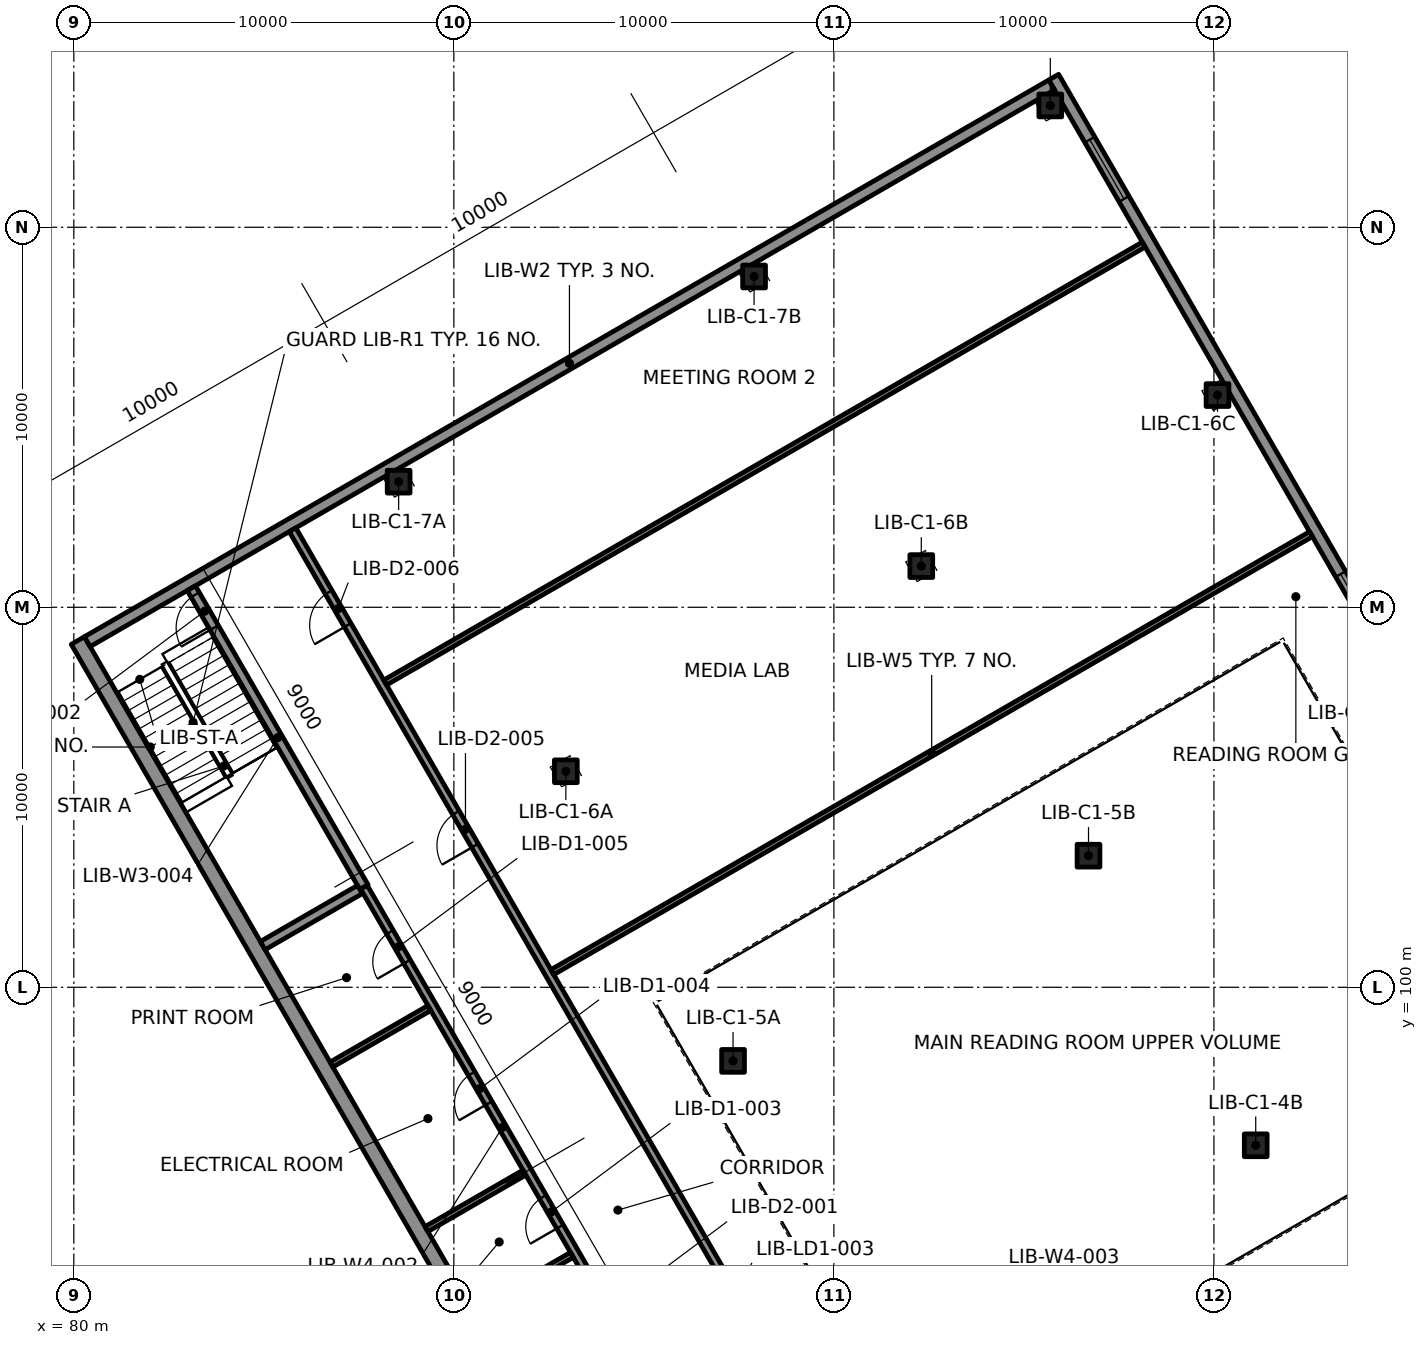
"""IFC4 building model, lengths in metres.
Left out: names, types, materials, properties, quantities, classifications, styles, units other than length and angle.
Written with IfcOpenShell. Run it as: python <this file> out.ifc"""

import sys

from ifc_helpers import new_model, si_unit, direction, frame, frame_2d, origin, origin_2d, place, context, subcontext, project, spatial, rectangle, extrude, element, fill, save


model = new_model("IFC4")
c1 = context("Model", 3, precision=1e-05, world=origin(), true_north=direction((0.0, 1.0)))
c2 = subcontext(c1, "Body", "Model", "MODEL_VIEW")
j1 = project(units=[si_unit("LENGTHUNIT", "METRE"), si_unit("PLANEANGLEUNIT", "RADIAN")], contexts=[c1])
p1 = place(None, origin())
s1 = spatial("IfcSite", under=j1, at=p1, CompositionType="ELEMENT")
p2 = place(p1, origin())
s2 = spatial("IfcBuilding", under=s1, at=p2, CompositionType="ELEMENT")
p3 = place(p2, frame((0.0, 0.0, 12.6)))
s3 = spatial("IfcBuildingStorey", under=s2, at=p3, CompositionType="ELEMENT", Elevation=12.6)
for number, where, z_axis, x_axis in (
    (1, (87.421, 93.256, -0.0), (0.0, 0.0, 1.0), (-0.5, 0.866, 0.0)),
    (2, (82.621, 101.57, -0.0), (0.0, 0.0, 1.0), (-0.5, 0.866, 0.0)),
):
    element("IfcColumn", number, at=place(p3, frame(where, z_axis=z_axis, x_axis=x_axis)), inside=s3, PredefinedType="COLUMN", context=c2, shape_type="SweptSolid", body=[
        extrude(rectangle(XDim=1.2, YDim=1.5, at=origin_2d()), origin(), (0.0, 0.0, 1.0), 4.6),
    ])
p4 = place(p3, frame((75.975, 98.1, 0.0), z_axis=(0.0, 0.0, 1.0), x_axis=(1.0, 0.0, 0.0)))
e3 = element("IfcWall", 3, at=p4, inside=s3, PredefinedType="PARTITIONING", context=c2, shape_type="SweptSolid", body=[
    extrude(rectangle(XDim=5.649, YDim=0.15, at=frame_2d((2.825, 0.0))), origin(), (0.0, 0.0, 1.0), 3.7),
])
p5 = place(p3, frame((81.7, 87.5, 0.0), z_axis=(0.0, 0.0, 1.0), x_axis=(0.0, 1.0, 0.0)))
e4 = element("IfcWall", 4, at=p5, inside=s3, PredefinedType="PARTITIONING", context=c2, shape_type="SweptSolid", body=[
    extrude(rectangle(XDim=10.599, YDim=0.15, at=frame_2d((5.3, 0.0))), origin(), (0.0, 0.0, 1.0), 3.7),
])
for number, where, z_axis, x_axis in (
    (5, (111.1, 95.842, -0.36), (0.0, 0.0, 1.0), (1.0, 0.0, 0.0)),
    (6, (97.347, 98.063, -0.36), (0.0, 0.0, 1.0), (1.0, 0.0, 0.0)),
    (7, (106.7, 103.463, -0.36), (0.0, 0.0, 1.0), (1.0, 0.0, 0.0)),
    (8, (92.947, 105.684, -0.36), (0.0, 0.0, 1.0), (1.0, 0.0, 0.0)),
    (9, (102.3, 111.084, -0.36), (0.0, 0.0, 1.0), (1.0, 0.0, 0.0)),
    (10, (110.094, 115.584, -0.36), (0.0, 0.0, 1.0), (1.0, 0.0, 0.0)),
    (11, (88.547, 113.305, -0.36), (0.0, 0.0, 1.0), (1.0, 0.0, 0.0)),
    (12, (97.9, 118.705, -0.36), (0.0, 0.0, 1.0), (1.0, 0.0, 0.0)),
    (13, (105.694, 123.205, -0.36), (0.0, 0.0, 1.0), (1.0, 0.0, 0.0)),
):
    element("IfcColumn", number, at=place(p3, frame(where, z_axis=z_axis, x_axis=x_axis)), inside=s3, PredefinedType="COLUMN", context=c2, shape_type="SweptSolid", body=[
        extrude(rectangle(XDim=0.6, YDim=0.6, at=origin_2d()), origin(), (0.0, 0.0, 1.0), 4.6),
    ])
p6 = place(p3, frame((107.106, 62.36, 0.0), z_axis=(0.0, 0.0, 1.0), x_axis=(-0.49999992739, 0.866025445706, 0.0)))
e14 = element("IfcWall", 14, at=p6, inside=s3, PredefinedType="SOLIDWALL", context=c2, shape_type="SweptSolid", body=[
    extrude(rectangle(XDim=54.0, YDim=0.4, at=frame_2d((27.0, 0.0))), origin(), (0.0, 0.0, 1.0), 4.24),
])
p7 = place(p3, frame((132.784, 77.185, 0.0), z_axis=(0.0, 0.0, 1.0), x_axis=(-0.49999992739, 0.866025445706, 0.0)))
e15 = element("IfcWall", 15, at=p7, inside=s3, PredefinedType="SOLIDWALL", context=c2, shape_type="SweptSolid", body=[
    extrude(rectangle(XDim=54.0, YDim=0.3, at=frame_2d((27.0, 0.0))), origin(), (0.0, 0.0, 1.0), 4.24),
])
p8 = place(p7, frame((1.9, 0.0, 0.9)))
e16 = element("IfcOpeningElement", 16, at=p8, cuts=e15, PredefinedType="OPENING", context=c2, shape_type="SweptSolid", body=[
    extrude(rectangle(XDim=1.8, YDim=2.4, at=frame_2d((0.9, 1.2))), frame((0.0, 0.16, 0.0), z_axis=(0.0, -1.0, 0.0), x_axis=(1.0, 0.0, 0.0)), (0.0, 0.0, 1.0), 0.32),
])
p9 = place(p7, frame((6.3, 0.0, 0.9)))
e17 = element("IfcOpeningElement", 17, at=p9, cuts=e15, PredefinedType="OPENING", context=c2, shape_type="SweptSolid", body=[
    extrude(rectangle(XDim=1.8, YDim=2.4, at=frame_2d((0.9, 1.2))), frame((0.0, 0.16, 0.0), z_axis=(0.0, -1.0, 0.0), x_axis=(1.0, 0.0, 0.0)), (0.0, 0.0, 1.0), 0.32),
])
p10 = place(p7, frame((10.7, 0.0, 0.9)))
e18 = element("IfcOpeningElement", 18, at=p10, cuts=e15, PredefinedType="OPENING", context=c2, shape_type="SweptSolid", body=[
    extrude(rectangle(XDim=1.8, YDim=2.4, at=frame_2d((0.9, 1.2))), frame((0.0, 0.16, 0.0), z_axis=(0.0, -1.0, 0.0), x_axis=(1.0, 0.0, 0.0)), (0.0, 0.0, 1.0), 0.32),
])
p11 = place(p7, frame((15.1, 0.0, 0.9)))
e19 = element("IfcOpeningElement", 19, at=p11, cuts=e15, PredefinedType="OPENING", context=c2, shape_type="SweptSolid", body=[
    extrude(rectangle(XDim=1.8, YDim=2.4, at=frame_2d((0.9, 1.2))), frame((0.0, 0.16, 0.0), z_axis=(0.0, -1.0, 0.0), x_axis=(1.0, 0.0, 0.0)), (0.0, 0.0, 1.0), 0.32),
])
p12 = place(p7, frame((19.5, 0.0, 0.9)))
e20 = element("IfcOpeningElement", 20, at=p12, cuts=e15, PredefinedType="OPENING", context=c2, shape_type="SweptSolid", body=[
    extrude(rectangle(XDim=1.8, YDim=2.4, at=frame_2d((0.9, 1.2))), frame((0.0, 0.16, 0.0), z_axis=(0.0, -1.0, 0.0), x_axis=(1.0, 0.0, 0.0)), (0.0, 0.0, 1.0), 0.32),
])
p13 = place(p7, frame((23.9, 0.0, 0.9)))
e21 = element("IfcOpeningElement", 21, at=p13, cuts=e15, PredefinedType="OPENING", context=c2, shape_type="SweptSolid", body=[
    extrude(rectangle(XDim=1.8, YDim=2.4, at=frame_2d((0.9, 1.2))), frame((0.0, 0.16, 0.0), z_axis=(0.0, -1.0, 0.0), x_axis=(1.0, 0.0, 0.0)), (0.0, 0.0, 1.0), 0.32),
])
p14 = place(p7, frame((28.3, 0.0, 0.9)))
e22 = element("IfcOpeningElement", 22, at=p14, cuts=e15, PredefinedType="OPENING", context=c2, shape_type="SweptSolid", body=[
    extrude(rectangle(XDim=1.8, YDim=2.4, at=frame_2d((0.9, 1.2))), frame((0.0, 0.16, 0.0), z_axis=(0.0, -1.0, 0.0), x_axis=(1.0, 0.0, 0.0)), (0.0, 0.0, 1.0), 0.32),
])
p15 = place(p7, frame((32.7, 0.0, 0.9)))
e23 = element("IfcOpeningElement", 23, at=p15, cuts=e15, PredefinedType="OPENING", context=c2, shape_type="SweptSolid", body=[
    extrude(rectangle(XDim=1.8, YDim=2.4, at=frame_2d((0.9, 1.2))), frame((0.0, 0.16, 0.0), z_axis=(0.0, -1.0, 0.0), x_axis=(1.0, 0.0, 0.0)), (0.0, 0.0, 1.0), 0.32),
])
p16 = place(p7, frame((37.1, 0.0, 0.9)))
e24 = element("IfcOpeningElement", 24, at=p16, cuts=e15, PredefinedType="OPENING", context=c2, shape_type="SweptSolid", body=[
    extrude(rectangle(XDim=1.8, YDim=2.4, at=frame_2d((0.9, 1.2))), frame((0.0, 0.16, 0.0), z_axis=(0.0, -1.0, 0.0), x_axis=(1.0, 0.0, 0.0)), (0.0, 0.0, 1.0), 0.32),
])
p17 = place(p7, frame((50.3, 0.0, 0.9)))
e25 = element("IfcOpeningElement", 25, at=p17, cuts=e15, PredefinedType="OPENING", context=c2, shape_type="SweptSolid", body=[
    extrude(rectangle(XDim=1.8, YDim=2.4, at=frame_2d((0.9, 1.2))), frame((0.0, 0.16, 0.0), z_axis=(0.0, -1.0, 0.0), x_axis=(1.0, 0.0, 0.0)), (0.0, 0.0, 1.0), 0.32),
])
p18 = place(p3, frame((80.354, 109.095, 0.0), z_axis=(0.0, 0.0, 1.0), x_axis=(0.866026568746, 0.499997982221, 0.0)))
e26 = element("IfcWall", 26, at=p18, inside=s3, PredefinedType="SOLIDWALL", context=c2, shape_type="SweptSolid", body=[
    extrude(rectangle(XDim=29.3, YDim=0.3, at=frame_2d((14.65, 0.0))), origin(), (0.0, 0.0, 1.0), 4.24),
])
p19 = place(p3, frame((87.635, 102.635, 0.0), z_axis=(0.0, 0.0, 1.0), x_axis=(-0.499994616197, 0.866028512102, 0.0)))
e27 = element("IfcWall", 27, at=p19, inside=s3, PredefinedType="SOLIDWALL", context=c2, shape_type="SweptSolid", body=[
    extrude(rectangle(XDim=9.085, YDim=0.25, at=frame_2d((4.542, 0.0))), origin(), (0.0, 0.0, 1.0), 4.24),
])
p20 = place(p19, frame((7.885, 0.0, 0.0)))
e28 = element("IfcOpeningElement", 28, at=p20, cuts=e27, PredefinedType="OPENING", context=c2, shape_type="SweptSolid", body=[
    extrude(rectangle(XDim=1.0, YDim=2.1, at=frame_2d((0.5, 1.05))), frame((0.0, 0.135, 0.0), z_axis=(0.0, -1.0, 0.0), x_axis=(1.0, 0.0, 0.0)), (0.0, 0.0, 1.0), 0.27),
])
p21 = place(p3, frame((94.93, 90.0, 0.0), z_axis=(0.0, 0.0, 1.0), x_axis=(-0.499997667785, 0.866026750285, 0.0)))
e29 = element("IfcWall", 29, at=p21, inside=s3, PredefinedType="PARTITIONING", context=c2, shape_type="SweptSolid", body=[
    extrude(rectangle(XDim=14.59, YDim=0.2, at=frame_2d((7.295, 0.0))), origin(), (0.0, 0.0, 1.0), 4.24),
])
p22 = place(p21, frame((1.235, 0.0, 0.0)))
e30 = element("IfcOpeningElement", 30, at=p22, cuts=e29, PredefinedType="OPENING", context=c2, shape_type="SweptSolid", body=[
    extrude(rectangle(XDim=1.0, YDim=2.1, at=frame_2d((0.5, 1.05))), frame((0.0, 0.11, 0.0), z_axis=(0.0, -1.0, 0.0), x_axis=(1.0, 0.0, 0.0)), (0.0, 0.0, 1.0), 0.22),
])
p23 = place(p21, frame((4.275, 0.0, 0.0)))
e31 = element("IfcOpeningElement", 31, at=p23, cuts=e29, PredefinedType="OPENING", context=c2, shape_type="SweptSolid", body=[
    extrude(rectangle(XDim=0.9, YDim=2.1, at=frame_2d((0.45, 1.05))), frame((0.0, 0.11, 0.0), z_axis=(0.0, -1.0, 0.0), x_axis=(1.0, 0.0, 0.0)), (0.0, 0.0, 1.0), 0.22),
])
p24 = place(p21, frame((8.025, 0.0, 0.0)))
e32 = element("IfcOpeningElement", 32, at=p24, cuts=e29, PredefinedType="OPENING", context=c2, shape_type="SweptSolid", body=[
    extrude(rectangle(XDim=0.9, YDim=2.1, at=frame_2d((0.45, 1.05))), frame((0.0, 0.11, 0.0), z_axis=(0.0, -1.0, 0.0), x_axis=(1.0, 0.0, 0.0)), (0.0, 0.0, 1.0), 0.22),
])
p25 = place(p21, frame((12.325, 0.0, 0.0)))
e33 = element("IfcOpeningElement", 33, at=p25, cuts=e29, PredefinedType="OPENING", context=c2, shape_type="SweptSolid", body=[
    extrude(rectangle(XDim=0.9, YDim=2.1, at=frame_2d((0.45, 1.05))), frame((0.0, 0.11, 0.0), z_axis=(0.0, -1.0, 0.0), x_axis=(1.0, 0.0, 0.0)), (0.0, 0.0, 1.0), 0.22),
])
for number, where, z_axis, x_axis in (
    (34, (90.529, 91.471, 0.0), (0.0, 0.0, 1.0), (0.866, 0.5, 0.0)),
    (35, (89.279, 93.636, 0.0), (0.0, 0.0, 1.0), (0.866, 0.5, 0.0)),
):
    element("IfcWall", number, at=place(p3, frame(where, z_axis=z_axis, x_axis=x_axis)), inside=s3, PredefinedType="PARTITIONING", context=c2, shape_type="SweptSolid", body=[
        extrude(rectangle(XDim=2.975, YDim=0.15, at=frame_2d((1.488, 0.0))), origin(), (0.0, 0.0, 1.0), 4.24),
    ])
p26 = place(p3, frame((86.779, 97.967, 0.0), z_axis=(0.0, 0.0, 1.0), x_axis=(0.866053027861, 0.499952150643, 0.0)))
e36 = element("IfcWall", 36, at=p26, inside=s3, PredefinedType="PARTITIONING", context=c2, shape_type="SweptSolid", body=[
    extrude(rectangle(XDim=2.975, YDim=0.15, at=frame_2d((1.487, 0.0))), origin(), (0.0, 0.0, 1.0), 4.24),
])
p27 = place(p3, frame((84.972, 101.097, 0.0), z_axis=(0.0, 0.0, 1.0), x_axis=(0.866039495442, 0.49997559174, 0.0)))
e37 = element("IfcWall", 37, at=p27, inside=s3, PredefinedType="SOLIDWALL", context=c2, shape_type="SweptSolid", body=[
    extrude(rectangle(XDim=2.95, YDim=0.25, at=frame_2d((1.475, 0.0))), origin(), (0.0, 0.0, 1.0), 4.24),
])
p28 = place(p3, frame((112.496, 65.725, 0.0), z_axis=(0.0, 0.0, 1.0), x_axis=(-0.499998673217, 0.866026169802, 0.0)))
e38 = element("IfcWall", 38, at=p28, inside=s3, PredefinedType="PARTITIONING", context=c2, shape_type="SweptSolid", body=[
    extrude(rectangle(XDim=53.48, YDim=0.2, at=frame_2d((26.74, 0.0))), origin(), (0.0, 0.0, 1.0), 4.24),
])
p29 = place(p28, frame((13.08, 0.0, 0.0)))
e39 = element("IfcOpeningElement", 39, at=p29, cuts=e38, PredefinedType="OPENING", context=c2, shape_type="SweptSolid", body=[
    extrude(rectangle(XDim=1.0, YDim=2.1, at=frame_2d((0.5, 1.05))), frame((0.0, 0.11, 0.0), z_axis=(0.0, -1.0, 0.0), x_axis=(1.0, 0.0, 0.0)), (0.0, 0.0, 1.0), 0.22),
])
p30 = place(p28, frame((26.28, 0.0, 0.0)))
e40 = element("IfcOpeningElement", 40, at=p30, cuts=e38, PredefinedType="OPENING", context=c2, shape_type="SweptSolid", body=[
    extrude(rectangle(XDim=1.0, YDim=2.1, at=frame_2d((0.5, 1.05))), frame((0.0, 0.11, 0.0), z_axis=(0.0, -1.0, 0.0), x_axis=(1.0, 0.0, 0.0)), (0.0, 0.0, 1.0), 0.22),
])
p31 = place(p28, frame((43.88, 0.0, 0.0)))
e41 = element("IfcOpeningElement", 41, at=p31, cuts=e38, PredefinedType="OPENING", context=c2, shape_type="SweptSolid", body=[
    extrude(rectangle(XDim=1.0, YDim=2.1, at=frame_2d((0.5, 1.05))), frame((0.0, 0.11, 0.0), z_axis=(0.0, -1.0, 0.0), x_axis=(1.0, 0.0, 0.0)), (0.0, 0.0, 1.0), 0.22),
])
p32 = place(p28, frame((50.58, 0.0, 0.0)))
e42 = element("IfcOpeningElement", 42, at=p32, cuts=e38, PredefinedType="OPENING", context=c2, shape_type="SweptSolid", body=[
    extrude(rectangle(XDim=1.0, YDim=2.1, at=frame_2d((0.5, 1.05))), frame((0.0, 0.11, 0.0), z_axis=(0.0, -1.0, 0.0), x_axis=(1.0, 0.0, 0.0)), (0.0, 0.0, 1.0), 0.22),
])
for number, where, z_axis, x_axis in (
    (43, (101.392, 85.157, 0.0), (0.0, 0.0, 1.0), (0.866, 0.5, 0.0)),
    (44, (92.592, 100.399, 0.0), (0.0, 0.0, 1.0), (0.866, 0.5, 0.0)),
    (45, (88.192, 108.02, 0.0), (0.0, 0.0, 1.0), (0.866, 0.5, 0.0)),
):
    element("IfcWall", number, at=place(p3, frame(where, z_axis=z_axis, x_axis=x_axis)), inside=s3, PredefinedType="PARTITIONING", context=c2, shape_type="SweptSolid", body=[
        extrude(rectangle(XDim=23.05, YDim=0.15, at=frame_2d((11.525, 0.0))), origin(), (0.0, 0.0, 1.0), 4.24),
    ])
p33 = place(p16, origin())
e46 = element("IfcWindow", 46, at=p33, inside=s3, PartitioningType="SINGLE_PANEL", PredefinedType="WINDOW", context=c2, shape_type="SweptSolid", body=[
    extrude(rectangle(XDim=1.8, YDim=2.4, at=frame_2d((0.9, 1.2))), frame((0.0, 0.03, 0.0), z_axis=(0.0, -1.0, 0.0), x_axis=(1.0, 0.0, 0.0)), (0.0, 0.0, 1.0), 0.06),
])
fill(e24, e46)
p34 = place(p17, origin())
e47 = element("IfcWindow", 47, at=p34, inside=s3, PartitioningType="SINGLE_PANEL", PredefinedType="WINDOW", context=c2, shape_type="SweptSolid", body=[
    extrude(rectangle(XDim=1.8, YDim=2.4, at=frame_2d((0.9, 1.2))), frame((0.0, 0.03, 0.0), z_axis=(0.0, -1.0, 0.0), x_axis=(1.0, 0.0, 0.0)), (0.0, 0.0, 1.0), 0.06),
])
fill(e25, e47)
p35 = place(p20, origin())
e48 = element("IfcDoor", 48, at=p35, inside=s3, OperationType="SINGLE_SWING_RIGHT", PredefinedType="DOOR", context=c2, shape_type="SweptSolid", body=[
    extrude(rectangle(XDim=1.0, YDim=2.1, at=frame_2d((0.5, 1.05))), frame((0.0, 0.025, 0.0), z_axis=(0.0, -1.0, 0.0), x_axis=(1.0, 0.0, 0.0)), (0.0, 0.0, 1.0), 0.05),
])
fill(e28, e48)
p36 = place(p23, origin())
e49 = element("IfcDoor", 49, at=p36, inside=s3, OperationType="SINGLE_SWING_RIGHT", PredefinedType="DOOR", context=c2, shape_type="SweptSolid", body=[
    extrude(rectangle(XDim=0.9, YDim=2.1, at=frame_2d((0.45, 1.05))), frame((0.0, 0.025, 0.0), z_axis=(0.0, -1.0, 0.0), x_axis=(1.0, 0.0, 0.0)), (0.0, 0.0, 1.0), 0.05),
])
fill(e31, e49)
p37 = place(p24, origin())
e50 = element("IfcDoor", 50, at=p37, inside=s3, OperationType="SINGLE_SWING_RIGHT", PredefinedType="DOOR", context=c2, shape_type="SweptSolid", body=[
    extrude(rectangle(XDim=0.9, YDim=2.1, at=frame_2d((0.45, 1.05))), frame((0.0, 0.025, 0.0), z_axis=(0.0, -1.0, 0.0), x_axis=(1.0, 0.0, 0.0)), (0.0, 0.0, 1.0), 0.05),
])
fill(e32, e50)
p38 = place(p25, origin())
e51 = element("IfcDoor", 51, at=p38, inside=s3, OperationType="SINGLE_SWING_LEFT", PredefinedType="DOOR", context=c2, shape_type="SweptSolid", body=[
    extrude(rectangle(XDim=0.9, YDim=2.1, at=frame_2d((0.45, 1.05))), frame((0.0, 0.025, 0.0), z_axis=(0.0, -1.0, 0.0), x_axis=(1.0, 0.0, 0.0)), (0.0, 0.0, 1.0), 0.05),
])
fill(e33, e51)
p39 = place(p31, origin())
e52 = element("IfcDoor", 52, at=p39, inside=s3, OperationType="SINGLE_SWING_LEFT", PredefinedType="DOOR", context=c2, shape_type="SweptSolid", body=[
    extrude(rectangle(XDim=1.0, YDim=2.1, at=frame_2d((0.5, 1.05))), frame((0.0, 0.025, 0.0), z_axis=(0.0, -1.0, 0.0), x_axis=(1.0, 0.0, 0.0)), (0.0, 0.0, 1.0), 0.05),
])
fill(e41, e52)
p40 = place(p32, origin())
e53 = element("IfcDoor", 53, at=p40, inside=s3, OperationType="SINGLE_SWING_RIGHT", PredefinedType="DOOR", context=c2, shape_type="SweptSolid", body=[
    extrude(rectangle(XDim=1.0, YDim=2.1, at=frame_2d((0.5, 1.05))), frame((0.0, 0.025, 0.0), z_axis=(0.0, -1.0, 0.0), x_axis=(1.0, 0.0, 0.0)), (0.0, 0.0, 1.0), 0.05),
])
fill(e42, e53)
save(model, sys.argv[1])
